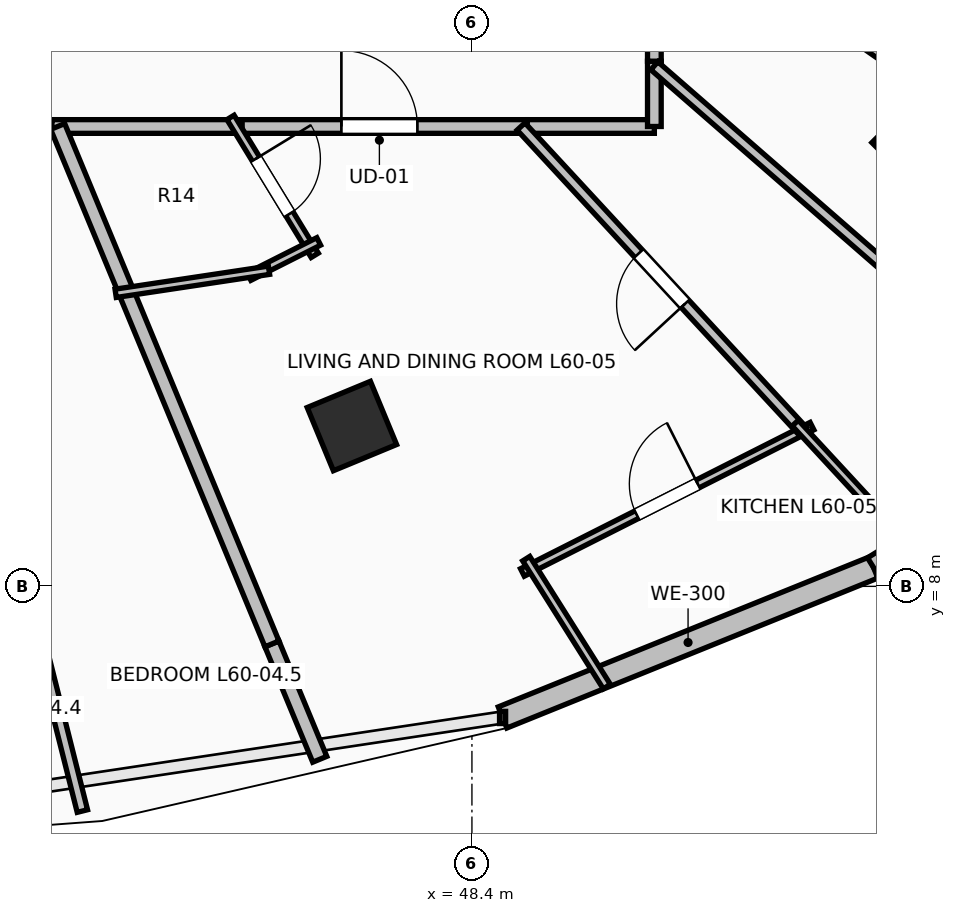
"""IFC4 building model, lengths in metres.
Left out: names, types, materials, properties, quantities, classifications, styles, units other than length and angle.
Written with IfcOpenShell. Run it as: python <this file> out.ifc"""

import sys

from ifc_helpers import new_model, si_unit, direction, frame, frame_2d, origin, origin_2d, place, context, subcontext, project, spatial, rectangle, extrude, element, fill, save


model = new_model("IFC4")
c1 = context("Model", 3, precision=1e-05, world=origin(), true_north=direction((0.0, 1.0)))
c2 = subcontext(c1, "Body", "Model", "MODEL_VIEW")
j1 = project(units=[si_unit("LENGTHUNIT", "METRE"), si_unit("PLANEANGLEUNIT", "RADIAN")], contexts=[c1])
p1 = place(None, origin())
s1 = spatial("IfcSite", under=j1, at=p1, CompositionType="ELEMENT")
p2 = place(p1, origin())
s2 = spatial("IfcBuilding", under=s1, at=p2, CompositionType="ELEMENT")
p3 = place(p2, frame((0.0, 0.0, 221.4)))
s3 = spatial("IfcBuildingStorey", under=s2, at=p3, CompositionType="ELEMENT", Elevation=221.4)
for number, where, z_axis, x_axis in (
    (1, (46.821, 10.109, 0.0), (0.0, 0.0, 1.0), (0.383, -0.924, 0.0)),
    (2, (54.299, 13.838, 0.0), (0.0, 0.0, 1.0), (0.707, -0.707, 0.0)),
):
    element("IfcColumn", number, at=place(p3, frame(where, z_axis=z_axis, x_axis=x_axis)), inside=s3, PredefinedType="COLUMN", context=c2, shape_type="SweptSolid", body=[
        extrude(rectangle(XDim=0.9, YDim=0.9, at=origin_2d()), origin(), (0.0, 0.0, 1.0), 3.55),
    ])
p4 = place(p3, frame((48.803, 6.275, 0.0), z_axis=(0.0, 0.0, 1.0), x_axis=(0.927111094334, 0.374786630981, 0.0)))
e3 = element("IfcWall", 3, at=p4, inside=s3, PredefinedType="STANDARD", context=c2, shape_type="SweptSolid", body=[
    extrude(rectangle(XDim=5.264, YDim=0.3, at=frame_2d((2.632, 0.0))), origin(), (0.0, 0.0, 1.0), 3.2),
])
p5 = place(p3, frame((53.684, 8.248, 0.0), z_axis=(0.0, 0.0, 1.0), x_axis=(0.849647657754, 0.527350791858, 0.0)))
e4 = element("IfcWall", 4, at=p5, inside=s3, PredefinedType="STANDARD", context=c2, shape_type="SweptSolid", body=[
    extrude(rectangle(XDim=5.035, YDim=0.3, at=frame_2d((2.518, 0.0))), origin(), (0.0, 0.0, 1.0), 3.2),
])
p6 = place(p5, frame((1.621, 0.0, 0.85)))
e5 = element("IfcOpeningElement", 5, at=p6, cuts=e4, PredefinedType="OPENING", context=c2, shape_type="SweptSolid", body=[
    extrude(rectangle(XDim=1.2, YDim=1.95, at=frame_2d((0.6, 0.975))), frame((0.0, 0.165, 0.0), z_axis=(0.0, -1.0, 0.0), x_axis=(1.0, 0.0, 0.0)), (0.0, 0.0, 1.0), 0.33),
])
p7 = place(p5, frame((3.636, 0.0, 0.85)))
e6 = element("IfcOpeningElement", 6, at=p7, cuts=e4, PredefinedType="OPENING", context=c2, shape_type="SweptSolid", body=[
    extrude(rectangle(XDim=1.2, YDim=1.95, at=frame_2d((0.6, 0.975))), frame((0.0, 0.165, 0.0), z_axis=(0.0, -1.0, 0.0), x_axis=(1.0, 0.0, 0.0)), (0.0, 0.0, 1.0), 0.33),
])
p8 = place(p3, frame((41.07, 14.05, 0.0), z_axis=(0.0, 0.0, 1.0), x_axis=(1.0, 0.0, 0.0)))
e7 = element("IfcWall", 7, at=p8, inside=s3, PredefinedType="PARTITIONING", context=c2, shape_type="SweptSolid", body=[
    extrude(rectangle(XDim=1.945, YDim=0.18, at=frame_2d((0.972, 0.0))), origin(), (0.0, 0.0, 1.0), 3.2),
])
p9 = place(p3, frame((45.237, 14.05, 0.0), z_axis=(0.0, 0.0, 1.0), x_axis=(1.0, 0.0, 0.0)))
e8 = element("IfcWall", 8, at=p9, inside=s3, PredefinedType="PARTITIONING", context=c2, shape_type="SweptSolid", body=[
    extrude(rectangle(XDim=3.891, YDim=0.18, at=frame_2d((1.945, 0.0))), origin(), (0.0, 0.0, 1.0), 2.392),
])
p10 = place(p9, frame((1.446, 0.0, 0.0)))
e9 = element("IfcOpeningElement", 9, at=p10, cuts=e8, PredefinedType="OPENING", context=c2, shape_type="SweptSolid", body=[
    extrude(rectangle(XDim=1.0, YDim=2.15, at=frame_2d((0.5, 1.075))), frame((0.0, 0.105, 0.0), z_axis=(0.0, -1.0, 0.0), x_axis=(1.0, 0.0, 0.0)), (0.0, 0.0, 1.0), 0.21),
])
p11 = place(p3, frame((42.875, 14.05, 0.0), z_axis=(0.0, 0.0, 1.0), x_axis=(1.0, 0.0, 0.0)))
e10 = element("IfcWall", 10, at=p11, inside=s3, PredefinedType="PARTITIONING", context=c2, shape_type="SweptSolid", body=[
    extrude(rectangle(XDim=2.502, YDim=0.18, at=frame_2d((1.251, 0.0))), origin(), (0.0, 0.0, 1.0), 2.392),
])
p12 = place(p3, frame((49.128, 14.05, 0.0), z_axis=(0.0, 0.0, 1.0), x_axis=(1.0, 0.0, 0.0)))
e11 = element("IfcWall", 11, at=p12, inside=s3, PredefinedType="PARTITIONING", context=c2, shape_type="SweptSolid", body=[
    extrude(rectangle(XDim=1.672, YDim=0.18, at=frame_2d((0.836, 0.0))), origin(), (0.0, 0.0, 1.0), 2.889),
])
p13 = place(p3, frame((50.8, 14.05, 0.0), z_axis=(0.0, 0.0, 1.0), x_axis=(0.0, 1.0, 0.0)))
e12 = element("IfcWall", 12, at=p13, inside=s3, PredefinedType="PARTITIONING", context=c2, shape_type="SweptSolid", body=[
    extrude(rectangle(XDim=0.859, YDim=0.18, at=frame_2d((0.429, 0.0))), origin(), (0.0, 0.0, 1.0), 2.889),
])
p14 = place(p3, frame((50.8, 14.909, 0.0), z_axis=(0.0, 0.0, 1.0), x_axis=(0.0, 1.0, 0.0)))
e13 = element("IfcWall", 13, at=p14, inside=s3, PredefinedType="PARTITIONING", context=c2, shape_type="SweptSolid", body=[
    extrude(rectangle(XDim=2.23, YDim=0.18, at=frame_2d((1.115, 0.0))), origin(), (0.0, 0.0, 1.0), 2.392),
])
p15 = place(p14, frame((0.69, 0.0, 0.0)))
e14 = element("IfcOpeningElement", 14, at=p15, cuts=e13, PredefinedType="OPENING", context=c2, shape_type="SweptSolid", body=[
    extrude(rectangle(XDim=0.85, YDim=2.1, at=frame_2d((0.425, 1.05))), frame((0.0, 0.105, 0.0), z_axis=(0.0, -1.0, 0.0), x_axis=(1.0, 0.0, 0.0)), (0.0, 0.0, 1.0), 0.21),
])
p16 = place(p3, frame((43.275, 5.044, 0.0), z_axis=(0.0, 0.0, 1.0), x_axis=(-0.244087876961, 0.969753117201, 0.0)))
e15 = element("IfcWall", 15, at=p16, inside=s3, PredefinedType="PARTITIONING", context=c2, shape_type="SweptSolid", body=[
    extrude(rectangle(XDim=9.287, YDim=0.14, at=frame_2d((4.644, 0.0))), origin(), (0.0, 0.0, 1.0), 2.392),
])
p17 = place(p16, frame((4.219, 0.0, 0.0)))
e16 = element("IfcOpeningElement", 16, at=p17, cuts=e15, PredefinedType="OPENING", context=c2, shape_type="SweptSolid", body=[
    extrude(rectangle(XDim=0.85, YDim=2.1, at=frame_2d((0.425, 1.05))), frame((0.0, 0.085, 0.0), z_axis=(0.0, -1.0, 0.0), x_axis=(1.0, 0.0, 0.0)), (0.0, 0.0, 1.0), 0.17),
])
p18 = place(p3, frame((46.398, 5.725, 0.0), z_axis=(0.0, 0.0, 1.0), x_axis=(-0.382789247432, 0.923835695376, 0.0)))
e17 = element("IfcWall", 17, at=p18, inside=s3, PredefinedType="PARTITIONING", context=c2, shape_type="SweptSolid", body=[
    extrude(rectangle(XDim=1.643, YDim=0.2, at=frame_2d((0.822, 0.0))), origin(), (0.0, 0.0, 1.0), 3.2),
])
p19 = place(p3, frame((45.769, 7.243, 0.0), z_axis=(0.0, 0.0, 1.0), x_axis=(-0.382623964136, 0.923904162816, 0.0)))
e18 = element("IfcWall", 18, at=p19, inside=s3, PredefinedType="PARTITIONING", context=c2, shape_type="SweptSolid", body=[
    extrude(rectangle(XDim=7.368, YDim=0.2, at=frame_2d((3.684, 0.0))), origin(), (0.0, 0.0, 1.0), 2.392),
])
p20 = place(p3, frame((45.224, 14.169, 0.0), z_axis=(0.0, 0.0, 1.0), x_axis=(0.52123627541, -0.853412412141, 0.0)))
e19 = element("IfcWall", 19, at=p20, inside=s3, PredefinedType="PARTITIONING", context=c2, shape_type="SweptSolid", body=[
    extrude(rectangle(XDim=2.125, YDim=0.11, at=frame_2d((1.063, 0.0))), origin(), (0.0, 0.0, 1.0), 2.392),
])
p21 = place(p20, frame((0.638, 0.0, 0.0)))
e20 = element("IfcOpeningElement", 20, at=p21, cuts=e19, PredefinedType="OPENING", context=c2, shape_type="SweptSolid", body=[
    extrude(rectangle(XDim=0.85, YDim=2.1, at=frame_2d((0.425, 1.05))), frame((0.0, 0.07, 0.0), z_axis=(0.0, -1.0, 0.0), x_axis=(1.0, 0.0, 0.0)), (0.0, 0.0, 1.0), 0.14),
])
p22 = place(p3, frame((46.384, 12.538, 0.0), z_axis=(0.0, 0.0, 1.0), x_axis=(-0.892613755874, -0.450822229737, 0.0)))
e21 = element("IfcWall", 21, at=p22, inside=s3, PredefinedType="PARTITIONING", context=c2, shape_type="SweptSolid", body=[
    extrude(rectangle(XDim=1.027, YDim=0.11, at=frame_2d((0.514, 0.0))), origin(), (0.0, 0.0, 1.0), 2.889),
])
p23 = place(p3, frame((45.73, 12.159, 0.0), z_axis=(0.0, 0.0, 1.0), x_axis=(-0.98887923552, -0.148720736812, 0.0)))
e22 = element("IfcWall", 22, at=p23, inside=s3, PredefinedType="PARTITIONING", context=c2, shape_type="SweptSolid", body=[
    extrude(rectangle(XDim=2.041, YDim=0.11, at=frame_2d((1.02, 0.0))), origin(), (0.0, 0.0, 1.0), 2.889),
])
p24 = place(p3, frame((49.064, 8.183, 0.0), z_axis=(0.0, 0.0, 1.0), x_axis=(0.892520393298, 0.451007037136, 0.0)))
e23 = element("IfcWall", 23, at=p24, inside=s3, PredefinedType="PARTITIONING", context=c2, shape_type="SweptSolid", body=[
    extrude(rectangle(XDim=4.269, YDim=0.11, at=frame_2d((2.134, 0.0))), origin(), (0.0, 0.0, 1.0), 3.2),
])
p25 = place(p24, frame((1.684, 0.0, 0.0)))
e24 = element("IfcOpeningElement", 24, at=p25, cuts=e23, PredefinedType="OPENING", context=c2, shape_type="SweptSolid", body=[
    extrude(rectangle(XDim=0.9, YDim=2.1, at=frame_2d((0.45, 1.05))), frame((0.0, 0.07, 0.0), z_axis=(0.0, -1.0, 0.0), x_axis=(1.0, 0.0, 0.0)), (0.0, 0.0, 1.0), 0.14),
])
p26 = place(p3, frame((50.175, 6.681, 0.0), z_axis=(0.0, 0.0, 1.0), x_axis=(-0.532930456912, 0.846159044208, 0.0)))
e25 = element("IfcWall", 25, at=p26, inside=s3, PredefinedType="PARTITIONING", context=c2, shape_type="SweptSolid", body=[
    extrude(rectangle(XDim=1.989, YDim=0.11, at=frame_2d((0.995, 0.0))), origin(), (0.0, 0.0, 1.0), 3.2),
])
p27 = place(p3, frame((52.749, 10.045, 0.0), z_axis=(0.0, 0.0, 1.0), x_axis=(-0.678882171058, 0.734247232081, 0.0)))
e26 = element("IfcWall", 26, at=p27, inside=s3, PredefinedType="PARTITIONING", context=c2, shape_type="SweptSolid", body=[
    extrude(rectangle(XDim=5.455, YDim=0.14, at=frame_2d((2.728, 0.0))), origin(), (0.0, 0.0, 1.0), 2.734),
])
p28 = place(p27, frame((2.277, 0.0, 0.0)))
e27 = element("IfcOpeningElement", 27, at=p28, cuts=e26, PredefinedType="OPENING", context=c2, shape_type="SweptSolid", body=[
    extrude(rectangle(XDim=0.9, YDim=2.1, at=frame_2d((0.45, 1.05))), frame((0.0, 0.085, 0.0), z_axis=(0.0, -1.0, 0.0), x_axis=(1.0, 0.0, 0.0)), (0.0, 0.0, 1.0), 0.17),
])
p29 = place(p3, frame((54.24, 8.432, 0.0), z_axis=(0.0, 0.0, 1.0), x_axis=(-0.678818101482, 0.734306465381, 0.0)))
e28 = element("IfcWall", 28, at=p29, inside=s3, PredefinedType="PARTITIONING", context=c2, shape_type="SweptSolid", body=[
    extrude(rectangle(XDim=2.336, YDim=0.11, at=frame_2d((1.168, 0.0))), origin(), (0.0, 0.0, 1.0), 3.2),
])
p30 = place(p3, frame((56.422, 9.951, 0.0), z_axis=(0.0, 0.0, 1.0), x_axis=(-0.753978537067, 0.656899052856, 0.0)))
e29 = element("IfcWall", 29, at=p30, inside=s3, PredefinedType="PARTITIONING", context=c2, shape_type="SweptSolid", body=[
    extrude(rectangle(XDim=7.457, YDim=0.14, at=frame_2d((3.728, 0.0))), origin(), (0.0, 0.0, 1.0), 2.734),
])
p31 = place(p3, frame((58.692, 11.578, 0.0), z_axis=(0.0, 0.0, 1.0), x_axis=(-0.820357038452, 0.571851667361, 0.0)))
e30 = element("IfcWall", 30, at=p31, inside=s3, PredefinedType="PARTITIONING", context=c2, shape_type="SweptSolid", body=[
    extrude(rectangle(XDim=9.62, YDim=0.14, at=frame_2d((4.81, 0.0))), origin(), (0.0, 0.0, 1.0), 2.734),
])
p32 = place(p3, frame((60.8, 13.524, 0.0), z_axis=(0.0, 0.0, 1.0), x_axis=(-0.877244884683, 0.480043135871, 0.0)))
e31 = element("IfcWall", 31, at=p32, inside=s3, PredefinedType="PARTITIONING", context=c2, shape_type="SweptSolid", body=[
    extrude(rectangle(XDim=11.399, YDim=0.14, at=frame_2d((5.7, 0.0))), origin(), (0.0, 0.0, 1.0), 2.734),
])
p33 = place(p10, origin())
e32 = element("IfcDoor", 32, at=p33, inside=s3, OperationType="SINGLE_SWING_LEFT", PredefinedType="DOOR", context=c2, shape_type="SweptSolid", body=[
    extrude(rectangle(XDim=1.0, YDim=2.15, at=frame_2d((0.5, 1.075))), frame((0.0, 0.025, 0.0), z_axis=(0.0, -1.0, 0.0), x_axis=(1.0, 0.0, 0.0)), (0.0, 0.0, 1.0), 0.05),
])
fill(e9, e32)
p34 = place(p21, origin())
e33 = element("IfcDoor", 33, at=p34, inside=s3, OperationType="SINGLE_SWING_LEFT", PredefinedType="DOOR", context=c2, shape_type="SweptSolid", body=[
    extrude(rectangle(XDim=0.85, YDim=2.1, at=frame_2d((0.425, 1.05))), frame((0.0, 0.025, 0.0), z_axis=(0.0, -1.0, 0.0), x_axis=(1.0, 0.0, 0.0)), (0.0, 0.0, 1.0), 0.05),
])
fill(e20, e33)
p35 = place(p25, origin())
e34 = element("IfcDoor", 34, at=p35, inside=s3, OperationType="SINGLE_SWING_RIGHT", PredefinedType="DOOR", context=c2, shape_type="SweptSolid", body=[
    extrude(rectangle(XDim=0.9, YDim=2.1, at=frame_2d((0.45, 1.05))), frame((0.0, 0.025, 0.0), z_axis=(0.0, -1.0, 0.0), x_axis=(1.0, 0.0, 0.0)), (0.0, 0.0, 1.0), 0.05),
])
fill(e24, e34)
p36 = place(p28, origin())
e35 = element("IfcDoor", 35, at=p36, inside=s3, OperationType="SINGLE_SWING_LEFT", PredefinedType="DOOR", context=c2, shape_type="SweptSolid", body=[
    extrude(rectangle(XDim=0.9, YDim=2.1, at=frame_2d((0.45, 1.05))), frame((0.0, 0.025, 0.0), z_axis=(0.0, -1.0, 0.0), x_axis=(1.0, 0.0, 0.0)), (0.0, 0.0, 1.0), 0.05),
])
fill(e27, e35)
save(model, sys.argv[1])
